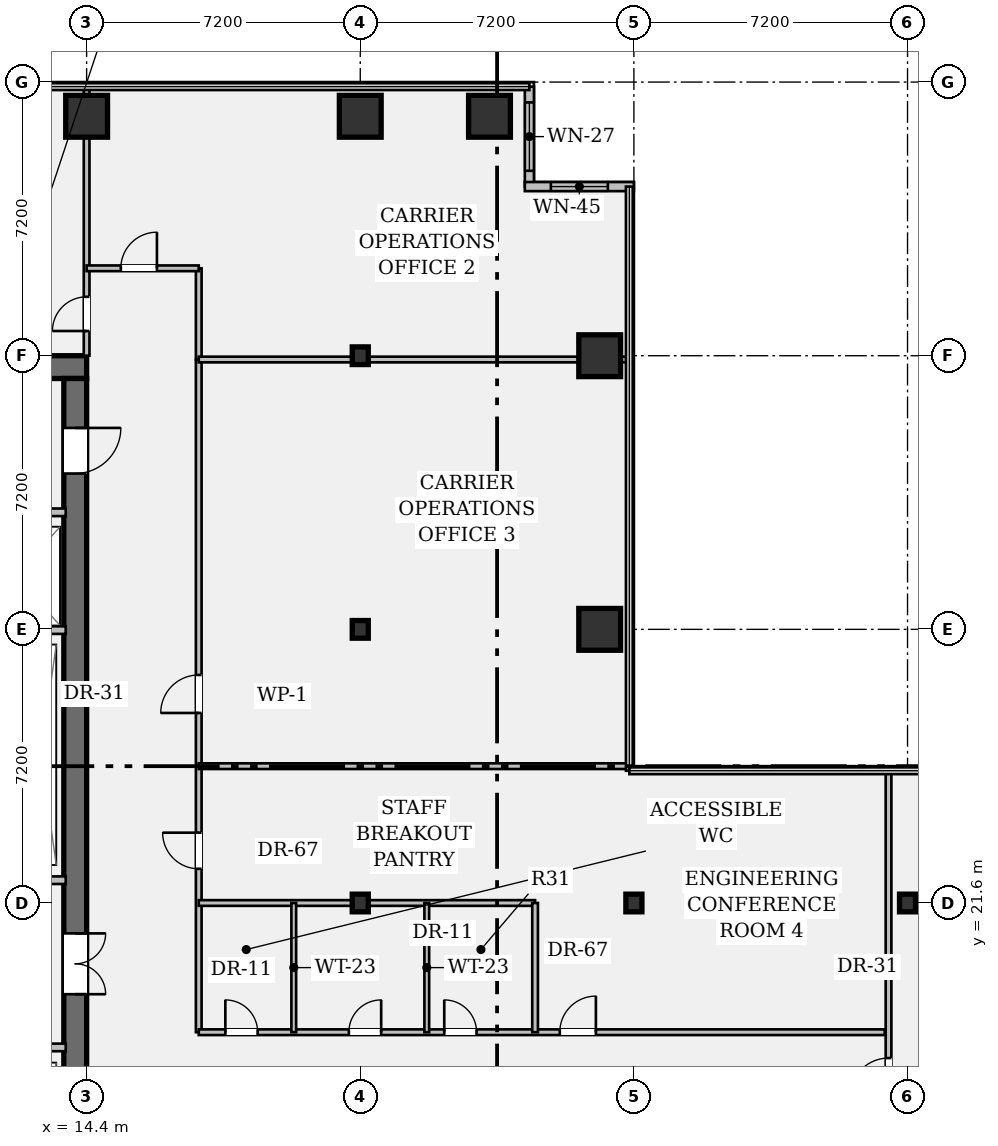
"""IFC4 building model, lengths in metres.
Left out: names, types, materials, properties, quantities, classifications, styles, units other than length and angle.
Written with IfcOpenShell. Run it as: python <this file> out.ifc"""

import sys

from ifc_helpers import new_model, si_unit, direction, frame, frame_2d, origin, origin_2d, place, context, subcontext, project, spatial, rectangle, hollow_rectangle, i_section, extrude, element, fill, save


model = new_model("IFC4")
c1 = context("Model", 3, precision=1e-05, world=origin(), true_north=direction((0.0, 1.0)))
c2 = subcontext(c1, "Body", "Model", "MODEL_VIEW")
j1 = project(units=[si_unit("LENGTHUNIT", "METRE"), si_unit("PLANEANGLEUNIT", "RADIAN")], contexts=[c1])
p1 = place(None, origin())
s1 = spatial("IfcSite", under=j1, at=p1, CompositionType="ELEMENT")
p2 = place(p1, origin())
s2 = spatial("IfcBuilding", under=s1, at=p2, CompositionType="ELEMENT")
p3 = place(p2, frame((0.0, 0.0, 42.7)))
s3 = spatial("IfcBuildingStorey", under=s2, at=p3, CompositionType="ELEMENT", Elevation=42.7)
p4 = place(p3, frame((0.6, 35.7, 0.0), z_axis=(0.0, 0.0, 1.0), x_axis=(1.0, 0.0, 0.0)))
e1 = element("IfcWall", 1, at=p4, inside=s3, PredefinedType="SHEAR", context=c2, shape_type="SweptSolid", body=[
    extrude(rectangle(XDim=13.8, YDim=0.6, at=frame_2d((6.9, 0.0))), origin(), (0.0, 0.0, 1.0), 3.57),
])
p5 = place(p3, frame((14.1, 35.4, 0.0), z_axis=(0.0, 0.0, 1.0), x_axis=(0.0, -1.0, 0.0)))
e2 = element("IfcWall", 2, at=p5, inside=s3, PredefinedType="SHEAR", context=c2, shape_type="SweptSolid", body=[
    extrude(rectangle(XDim=27.6, YDim=0.6, at=frame_2d((13.8, 0.0))), origin(), (0.0, 0.0, 1.0), 3.57),
])
p6 = place(p5, frame((1.3, 0.0, 0.0)))
e3 = element("IfcOpeningElement", 3, at=p6, cuts=e2, PredefinedType="OPENING", context=c2, shape_type="SweptSolid", body=[
    extrude(rectangle(XDim=1.2, YDim=2.15, at=frame_2d((0.6, 1.075))), frame((0.0, 0.312, 0.0), z_axis=(0.0, -1.0, 0.0), x_axis=(1.0, 0.0, 0.0)), (0.0, 0.0, 1.0), 0.624),
])
p7 = place(p5, frame((25.25, 0.0, 0.0)))
e4 = element("IfcOpeningElement", 4, at=p7, cuts=e2, PredefinedType="OPENING", context=c2, shape_type="SweptSolid", body=[
    extrude(rectangle(XDim=1.2, YDim=2.15, at=frame_2d((0.6, 1.075))), frame((0.0, 0.312, 0.0), z_axis=(0.0, -1.0, 0.0), x_axis=(1.0, 0.0, 0.0)), (0.0, 0.0, 1.0), 0.624),
])
p8 = place(p5, frame((14.6, 0.0, 0.0)))
e5 = element("IfcOpeningElement", 5, at=p8, cuts=e2, PredefinedType="OPENING", context=c2, shape_type="SweptSolid", body=[
    extrude(rectangle(XDim=1.6, YDim=2.2, at=frame_2d((0.8, 1.1))), frame((0.0, 0.312, 0.0), z_axis=(0.0, -1.0, 0.0), x_axis=(1.0, 0.0, 0.0)), (0.0, 0.0, 1.0), 0.624),
])
p9 = place(p3, frame((14.4, 42.3, 0.0), z_axis=(0.0, 0.0, 1.0), x_axis=(1.0, 0.0, 0.0)))
e6 = element("IfcColumn", 6, at=p9, inside=s3, PredefinedType="COLUMN", context=c2, shape_type="SweptSolid", body=[
    extrude(hollow_rectangle(XDim=1.1, YDim=1.1, WallThickness=0.07, at=origin_2d()), origin(), (0.0, 0.0, 1.0), 3.57),
])
for number, where, z_axis, x_axis in (
    (7, (21.6, 21.6, 0.0), (0.0, 0.0, 1.0), (1.0, 0.0, 0.0)),
    (8, (21.6, 28.8, 0.0), (0.0, 0.0, 1.0), (1.0, 0.0, 0.0)),
    (9, (21.6, 36.0, 0.0), (0.0, 0.0, 1.0), (1.0, 0.0, 0.0)),
):
    element("IfcColumn", number, at=place(p3, frame(where, z_axis=z_axis, x_axis=x_axis)), inside=s3, PredefinedType="COLUMN", context=c2, shape_type="SweptSolid", body=[
        extrude(i_section(OverallWidth=0.422, OverallDepth=0.465, WebThickness=0.045, FlangeThickness=0.073, FilletRadius=0.018, at=origin_2d()), origin(), (0.0, 0.0, 1.0), 3.57),
    ])
for number, where, z_axis, x_axis in (
    (10, (21.6, 42.3, 0.0), (0.0, 0.0, 1.0), (1.0, 0.0, 0.0)),
    (11, (25.0, 42.3, 0.0), (0.0, 0.0, 1.0), (1.0, 0.0, 0.0)),
    (12, (27.9, 28.8, 0.0), (0.0, 0.0, 1.0), (1.0, 0.0, 0.0)),
    (13, (27.9, 36.0, 0.0), (0.0, 0.0, 1.0), (1.0, 0.0, 0.0)),
):
    element("IfcColumn", number, at=place(p3, frame(where, z_axis=z_axis, x_axis=x_axis)), inside=s3, PredefinedType="COLUMN", context=c2, shape_type="SweptSolid", body=[
        extrude(hollow_rectangle(XDim=1.1, YDim=1.1, WallThickness=0.07, at=origin_2d()), origin(), (0.0, 0.0, 1.0), 3.57),
    ])
for number, where, z_axis, x_axis in (
    (14, (28.8, 21.6, 0.0), (0.0, 0.0, 1.0), (1.0, 0.0, 0.0)),
    (15, (36.0, 21.6, 0.0), (0.0, 0.0, 1.0), (1.0, 0.0, 0.0)),
):
    element("IfcColumn", number, at=place(p3, frame(where, z_axis=z_axis, x_axis=x_axis)), inside=s3, PredefinedType="COLUMN", context=c2, shape_type="SweptSolid", body=[
        extrude(i_section(OverallWidth=0.422, OverallDepth=0.465, WebThickness=0.045, FlangeThickness=0.073, FilletRadius=0.018, at=origin_2d()), origin(), (0.0, 0.0, 1.0), 3.57),
    ])
p10 = place(p3, frame((26.05, 43.08, 0.0), z_axis=(0.0, 0.0, 1.0), x_axis=(0.0, -1.0, 0.0)))
e16 = element("IfcWall", 16, at=p10, inside=s3, PredefinedType="STANDARD", context=c2, shape_type="SweptSolid", body=[
    extrude(rectangle(XDim=2.63, YDim=0.24, at=frame_2d((1.315, 0.0))), origin(), (0.0, 0.0, 1.0), 3.57),
])
p11 = place(p10, frame((0.415, 0.0, 0.95)))
e17 = element("IfcOpeningElement", 17, at=p11, cuts=e16, PredefinedType="OPENING", context=c2, shape_type="SweptSolid", body=[
    extrude(rectangle(XDim=1.8, YDim=1.35, at=frame_2d((0.9, 0.675))), frame((0.0, 0.132, 0.0), z_axis=(0.0, -1.0, 0.0), x_axis=(1.0, 0.0, 0.0)), (0.0, 0.0, 1.0), 0.264),
])
p12 = place(p3, frame((25.93, 40.45, 0.0), z_axis=(0.0, 0.0, 1.0), x_axis=(1.0, 0.0, 0.0)))
e18 = element("IfcWall", 18, at=p12, inside=s3, PredefinedType="STANDARD", context=c2, shape_type="SweptSolid", body=[
    extrude(rectangle(XDim=2.87, YDim=0.24, at=frame_2d((1.435, 0.0))), origin(), (0.0, 0.0, 1.0), 3.57),
])
p13 = place(p12, frame((0.685, 0.0, 0.95)))
e19 = element("IfcOpeningElement", 19, at=p13, cuts=e18, PredefinedType="OPENING", context=c2, shape_type="SweptSolid", body=[
    extrude(rectangle(XDim=1.5, YDim=1.8, at=frame_2d((0.75, 0.9))), frame((0.0, 0.132, 0.0), z_axis=(0.0, -1.0, 0.0), x_axis=(1.0, 0.0, 0.0)), (0.0, 0.0, 1.0), 0.264),
])
p14 = place(p3, frame((8.7, 31.88, 0.0), z_axis=(0.0, 0.0, 1.0), x_axis=(1.0, 0.0, 0.0)))
e20 = element("IfcWall", 20, at=p14, inside=s3, PredefinedType="PARTITIONING", context=c2, shape_type="SweptSolid", body=[
    extrude(rectangle(XDim=5.15, YDim=0.2, at=frame_2d((2.575, 0.0))), origin(), (0.0, 0.0, 1.0), 3.57),
])
p15 = place(p14, frame((0.75, 0.0, 0.0)))
e21 = element("IfcOpeningElement", 21, at=p15, cuts=e20, PredefinedType="OPENING", context=c2, shape_type="SweptSolid", body=[
    extrude(rectangle(XDim=1.2, YDim=2.2, at=frame_2d((0.6, 1.1))), frame((0.0, 0.112, 0.0), z_axis=(0.0, -1.0, 0.0), x_axis=(1.0, 0.0, 0.0)), (0.0, 0.0, 1.0), 0.224),
])
p16 = place(p14, frame((3.25, 0.0, 0.0)))
e22 = element("IfcOpeningElement", 22, at=p16, cuts=e20, PredefinedType="OPENING", context=c2, shape_type="SweptSolid", body=[
    extrude(rectangle(XDim=1.2, YDim=2.2, at=frame_2d((0.6, 1.1))), frame((0.0, 0.112, 0.0), z_axis=(0.0, -1.0, 0.0), x_axis=(1.0, 0.0, 0.0)), (0.0, 0.0, 1.0), 0.224),
])
p17 = place(p3, frame((8.7, 28.78, 0.0), z_axis=(0.0, 0.0, 1.0), x_axis=(1.0, 0.0, 0.0)))
e23 = element("IfcWall", 23, at=p17, inside=s3, PredefinedType="PARTITIONING", context=c2, shape_type="SweptSolid", body=[
    extrude(rectangle(XDim=5.15, YDim=0.2, at=frame_2d((2.575, 0.0))), origin(), (0.0, 0.0, 1.0), 3.57),
])
for number, where, z_axis, x_axis in (
    (24, (7.1, 22.2, 0.0), (0.0, 0.0, 1.0), (1.0, 0.0, 0.0)),
    (25, (7.1, 17.8, 0.0), (0.0, 0.0, 1.0), (1.0, 0.0, 0.0)),
):
    element("IfcWall", number, at=place(p3, frame(where, z_axis=z_axis, x_axis=x_axis)), inside=s3, PredefinedType="PARTITIONING", context=c2, shape_type="SweptSolid", body=[
        extrude(rectangle(XDim=6.75, YDim=0.2, at=frame_2d((3.375, 0.0))), origin(), (0.0, 0.0, 1.0), 3.57),
    ])
p18 = place(p3, frame((17.35, 18.2, 0.0), z_axis=(0.0, 0.0, 1.0), x_axis=(0.0, 1.0, 0.0)))
e26 = element("IfcWall", 26, at=p18, inside=s3, PredefinedType="PARTITIONING", context=c2, shape_type="SweptSolid", body=[
    extrude(rectangle(XDim=17.7, YDim=0.15, at=frame_2d((8.85, 0.0))), origin(), (0.0, 0.0, 1.0), 2.699),
])
p19 = place(p18, frame((4.3, 0.0, 0.0)))
e27 = element("IfcOpeningElement", 27, at=p19, cuts=e26, PredefinedType="OPENING", context=c2, shape_type="SweptSolid", body=[
    extrude(rectangle(XDim=0.95, YDim=2.15, at=frame_2d((0.475, 1.075))), frame((0.0, 0.087, 0.0), z_axis=(0.0, -1.0, 0.0), x_axis=(1.0, 0.0, 0.0)), (0.0, 0.0, 1.0), 0.174),
])
p20 = place(p18, frame((8.4, 0.0, 0.0)))
e28 = element("IfcOpeningElement", 28, at=p20, cuts=e26, PredefinedType="OPENING", context=c2, shape_type="SweptSolid", body=[
    extrude(rectangle(XDim=1.0, YDim=2.15, at=frame_2d((0.5, 1.075))), frame((0.0, 0.087, 0.0), z_axis=(0.0, -1.0, 0.0), x_axis=(1.0, 0.0, 0.0)), (0.0, 0.0, 1.0), 0.174),
])
p21 = place(p3, frame((17.35, 18.2, 0.0), z_axis=(0.0, 0.0, 1.0), x_axis=(1.0, 0.0, 0.0)))
e29 = element("IfcWall", 29, at=p21, inside=s3, PredefinedType="PARTITIONING", context=c2, shape_type="SweptSolid", body=[
    extrude(rectangle(XDim=18.05, YDim=0.15, at=frame_2d((9.025, 0.0))), origin(), (0.0, 0.0, 1.0), 2.699),
])
p22 = place(p21, frame((0.7, 0.0, 0.0)))
e30 = element("IfcOpeningElement", 30, at=p22, cuts=e29, PredefinedType="OPENING", context=c2, shape_type="SweptSolid", body=[
    extrude(rectangle(XDim=0.85, YDim=2.15, at=frame_2d((0.425, 1.075))), frame((0.0, 0.087, 0.0), z_axis=(0.0, -1.0, 0.0), x_axis=(1.0, 0.0, 0.0)), (0.0, 0.0, 1.0), 0.174),
])
p23 = place(p21, frame((3.95, 0.0, 0.0)))
e31 = element("IfcOpeningElement", 31, at=p23, cuts=e29, PredefinedType="OPENING", context=c2, shape_type="SweptSolid", body=[
    extrude(rectangle(XDim=0.85, YDim=2.15, at=frame_2d((0.425, 1.075))), frame((0.0, 0.087, 0.0), z_axis=(0.0, -1.0, 0.0), x_axis=(1.0, 0.0, 0.0)), (0.0, 0.0, 1.0), 0.174),
])
p24 = place(p21, frame((6.46, 0.0, 0.0)))
e32 = element("IfcOpeningElement", 32, at=p24, cuts=e29, PredefinedType="OPENING", context=c2, shape_type="SweptSolid", body=[
    extrude(rectangle(XDim=0.85, YDim=2.15, at=frame_2d((0.425, 1.075))), frame((0.0, 0.087, 0.0), z_axis=(0.0, -1.0, 0.0), x_axis=(1.0, 0.0, 0.0)), (0.0, 0.0, 1.0), 0.174),
])
p25 = place(p21, frame((9.5, 0.0, 0.0)))
e33 = element("IfcOpeningElement", 33, at=p25, cuts=e29, PredefinedType="OPENING", context=c2, shape_type="SweptSolid", body=[
    extrude(rectangle(XDim=0.95, YDim=2.15, at=frame_2d((0.475, 1.075))), frame((0.0, 0.087, 0.0), z_axis=(0.0, -1.0, 0.0), x_axis=(1.0, 0.0, 0.0)), (0.0, 0.0, 1.0), 0.174),
])
p26 = place(p3, frame((35.5, 0.12, 0.0), z_axis=(0.0, 0.0, 1.0), x_axis=(0.0, 1.0, 0.0)))
e34 = element("IfcWall", 34, at=p26, inside=s3, PredefinedType="PARTITIONING", context=c2, shape_type="SweptSolid", body=[
    extrude(rectangle(XDim=24.96, YDim=0.15, at=frame_2d((12.48, 0.0))), origin(), (0.0, 0.0, 1.0), 2.699),
])
p27 = place(p26, frame((16.4, 0.0, 0.0)))
e35 = element("IfcOpeningElement", 35, at=p27, cuts=e34, PredefinedType="OPENING", context=c2, shape_type="SweptSolid", body=[
    extrude(rectangle(XDim=1.0, YDim=2.15, at=frame_2d((0.5, 1.075))), frame((0.0, 0.087, 0.0), z_axis=(0.0, -1.0, 0.0), x_axis=(1.0, 0.0, 0.0)), (0.0, 0.0, 1.0), 0.174),
])
p28 = place(p3, frame((14.4, 36.0, 0.0), z_axis=(0.0, 0.0, 1.0), x_axis=(0.0, 1.0, 0.0)))
e36 = element("IfcWall", 36, at=p28, inside=s3, PredefinedType="PARTITIONING", context=c2, shape_type="SweptSolid", body=[
    extrude(rectangle(XDim=7.08, YDim=0.15, at=frame_2d((3.54, 0.0))), origin(), (0.0, 0.0, 1.0), 2.699),
])
p29 = place(p28, frame((0.65, 0.0, 0.0)))
e37 = element("IfcOpeningElement", 37, at=p29, cuts=e36, PredefinedType="OPENING", context=c2, shape_type="SweptSolid", body=[
    extrude(rectangle(XDim=0.9, YDim=2.15, at=frame_2d((0.45, 1.075))), frame((0.0, 0.087, 0.0), z_axis=(0.0, -1.0, 0.0), x_axis=(1.0, 0.0, 0.0)), (0.0, 0.0, 1.0), 0.174),
])
p30 = place(p3, frame((17.35, 35.9, 0.0), z_axis=(0.0, 0.0, 1.0), x_axis=(0.0, 1.0, 0.0)))
e38 = element("IfcWall", 38, at=p30, inside=s3, PredefinedType="PARTITIONING", context=c2, shape_type="SweptSolid", body=[
    extrude(rectangle(XDim=2.4, YDim=0.15, at=frame_2d((1.2, 0.0))), origin(), (0.0, 0.0, 1.0), 2.699),
])
p31 = place(p3, frame((14.4, 38.3, 0.0), z_axis=(0.0, 0.0, 1.0), x_axis=(1.0, 0.0, 0.0)))
e39 = element("IfcWall", 39, at=p31, inside=s3, PredefinedType="PARTITIONING", context=c2, shape_type="SweptSolid", body=[
    extrude(rectangle(XDim=2.95, YDim=0.15, at=frame_2d((1.475, 0.0))), origin(), (0.0, 0.0, 1.0), 2.699),
])
p32 = place(p31, frame((0.9, 0.0, 0.0)))
e40 = element("IfcOpeningElement", 40, at=p32, cuts=e39, PredefinedType="OPENING", context=c2, shape_type="SweptSolid", body=[
    extrude(rectangle(XDim=0.95, YDim=2.15, at=frame_2d((0.475, 1.075))), frame((0.0, 0.087, 0.0), z_axis=(0.0, -1.0, 0.0), x_axis=(1.0, 0.0, 0.0)), (0.0, 0.0, 1.0), 0.174),
])
p33 = place(p3, frame((17.35, 35.9, 0.0), z_axis=(0.0, 0.0, 1.0), x_axis=(1.0, 0.0, 0.0)))
e41 = element("IfcWall", 41, at=p33, inside=s3, PredefinedType="PARTITIONING", context=c2, shape_type="SweptSolid", body=[
    extrude(rectangle(XDim=11.33, YDim=0.15, at=frame_2d((5.665, 0.0))), origin(), (0.0, 0.0, 1.0), 2.699),
])
p34 = place(p3, frame((17.35, 21.6, 0.0), z_axis=(0.0, 0.0, 1.0), x_axis=(1.0, 0.0, 0.0)))
e42 = element("IfcWall", 42, at=p34, inside=s3, PredefinedType="PARTITIONING", context=c2, shape_type="SweptSolid", body=[
    extrude(rectangle(XDim=8.85, YDim=0.15, at=frame_2d((4.425, 0.0))), origin(), (0.0, 0.0, 1.0), 2.699),
])
p35 = place(p3, frame((26.2, 18.2, 0.0), z_axis=(0.0, 0.0, 1.0), x_axis=(0.0, 1.0, 0.0)))
e43 = element("IfcWall", 43, at=p35, inside=s3, PredefinedType="PARTITIONING", context=c2, shape_type="SweptSolid", body=[
    extrude(rectangle(XDim=3.4, YDim=0.15, at=frame_2d((1.7, 0.0))), origin(), (0.0, 0.0, 1.0), 2.699),
])
for number, where, z_axis, x_axis in (
    (44, (19.85, 18.2, 0.0), (0.0, 0.0, 1.0), (0.0, 1.0, 0.0)),
    (45, (23.35, 18.2, 0.0), (0.0, 0.0, 1.0), (0.0, 1.0, 0.0)),
):
    element("IfcWall", number, at=place(p3, frame(where, z_axis=z_axis, x_axis=x_axis)), inside=s3, PredefinedType="PARTITIONING", context=c2, shape_type="SweptSolid", body=[
        extrude(rectangle(XDim=3.4, YDim=0.125, at=frame_2d((1.7, 0.0))), origin(), (0.0, 0.0, 1.0), 2.699),
    ])
p36 = place(p3, frame((17.35, 25.2, 0.0), z_axis=(0.0, 0.0, 1.0), x_axis=(1.0, 0.0, 0.0)))
e46 = element("IfcWall", 46, at=p36, inside=s3, PredefinedType="PARTITIONING", context=c2, shape_type="SweptSolid", body=[
    extrude(rectangle(XDim=11.33, YDim=0.15, at=frame_2d((5.665, 0.0))), origin(), (0.0, 0.0, 1.0), 2.699),
])
p37 = place(p11, origin())
e47 = element("IfcWindow", 47, at=p37, inside=s3, PartitioningType="SINGLE_PANEL", PredefinedType="WINDOW", context=c2, shape_type="SweptSolid", body=[
    extrude(rectangle(XDim=1.8, YDim=1.35, at=frame_2d((0.9, 0.675))), frame((0.0, 0.03, 0.0), z_axis=(0.0, -1.0, 0.0), x_axis=(1.0, 0.0, 0.0)), (0.0, 0.0, 1.0), 0.06),
])
fill(e17, e47)
p38 = place(p13, origin())
e48 = element("IfcWindow", 48, at=p38, inside=s3, PartitioningType="SINGLE_PANEL", PredefinedType="WINDOW", context=c2, shape_type="SweptSolid", body=[
    extrude(rectangle(XDim=1.5, YDim=1.8, at=frame_2d((0.75, 0.9))), frame((0.0, 0.03, 0.0), z_axis=(0.0, -1.0, 0.0), x_axis=(1.0, 0.0, 0.0)), (0.0, 0.0, 1.0), 0.06),
])
fill(e19, e48)
p39 = place(p6, origin())
e49 = element("IfcDoor", 49, at=p39, inside=s3, OperationType="SINGLE_SWING_LEFT", PredefinedType="DOOR", context=c2, shape_type="SweptSolid", body=[
    extrude(rectangle(XDim=1.2, YDim=2.15, at=frame_2d((0.6, 1.075))), frame((0.0, 0.025, 0.0), z_axis=(0.0, -1.0, 0.0), x_axis=(1.0, 0.0, 0.0)), (0.0, 0.0, 1.0), 0.05),
])
fill(e3, e49)
p40 = place(p8, origin())
e50 = element("IfcDoor", 50, at=p40, inside=s3, OperationType="DOUBLE_DOOR_SINGLE_SWING", PredefinedType="DOOR", context=c2, shape_type="SweptSolid", body=[
    extrude(rectangle(XDim=1.6, YDim=2.2, at=frame_2d((0.8, 1.1))), frame((0.0, 0.025, 0.0), z_axis=(0.0, -1.0, 0.0), x_axis=(1.0, 0.0, 0.0)), (0.0, 0.0, 1.0), 0.05),
])
fill(e5, e50)
p41 = place(p29, origin())
e51 = element("IfcDoor", 51, at=p41, inside=s3, OperationType="SINGLE_SWING_LEFT", PredefinedType="DOOR", context=c2, shape_type="SweptSolid", body=[
    extrude(rectangle(XDim=0.9, YDim=2.15, at=frame_2d((0.45, 1.075))), frame((0.0, 0.025, 0.0), z_axis=(0.0, -1.0, 0.0), x_axis=(1.0, 0.0, 0.0)), (0.0, 0.0, 1.0), 0.05),
])
fill(e37, e51)
p42 = place(p32, origin())
e52 = element("IfcDoor", 52, at=p42, inside=s3, OperationType="SINGLE_SWING_RIGHT", PredefinedType="DOOR", context=c2, shape_type="SweptSolid", body=[
    extrude(rectangle(XDim=0.95, YDim=2.15, at=frame_2d((0.475, 1.075))), frame((0.0, 0.025, 0.0), z_axis=(0.0, -1.0, 0.0), x_axis=(1.0, 0.0, 0.0)), (0.0, 0.0, 1.0), 0.05),
])
fill(e40, e52)
p43 = place(p22, origin())
e53 = element("IfcDoor", 53, at=p43, inside=s3, OperationType="SINGLE_SWING_LEFT", PredefinedType="DOOR", context=c2, shape_type="SweptSolid", body=[
    extrude(rectangle(XDim=0.85, YDim=2.15, at=frame_2d((0.425, 1.075))), frame((0.0, 0.025, 0.0), z_axis=(0.0, -1.0, 0.0), x_axis=(1.0, 0.0, 0.0)), (0.0, 0.0, 1.0), 0.05),
])
fill(e30, e53)
p44 = place(p23, origin())
e54 = element("IfcDoor", 54, at=p44, inside=s3, OperationType="SINGLE_SWING_RIGHT", PredefinedType="DOOR", context=c2, shape_type="SweptSolid", body=[
    extrude(rectangle(XDim=0.85, YDim=2.15, at=frame_2d((0.425, 1.075))), frame((0.0, 0.025, 0.0), z_axis=(0.0, -1.0, 0.0), x_axis=(1.0, 0.0, 0.0)), (0.0, 0.0, 1.0), 0.05),
])
fill(e31, e54)
p45 = place(p24, origin())
e55 = element("IfcDoor", 55, at=p45, inside=s3, OperationType="SINGLE_SWING_LEFT", PredefinedType="DOOR", context=c2, shape_type="SweptSolid", body=[
    extrude(rectangle(XDim=0.85, YDim=2.15, at=frame_2d((0.425, 1.075))), frame((0.0, 0.025, 0.0), z_axis=(0.0, -1.0, 0.0), x_axis=(1.0, 0.0, 0.0)), (0.0, 0.0, 1.0), 0.05),
])
fill(e32, e55)
p46 = place(p19, origin())
e56 = element("IfcDoor", 56, at=p46, inside=s3, OperationType="SINGLE_SWING_RIGHT", PredefinedType="DOOR", context=c2, shape_type="SweptSolid", body=[
    extrude(rectangle(XDim=0.95, YDim=2.15, at=frame_2d((0.475, 1.075))), frame((0.0, 0.025, 0.0), z_axis=(0.0, -1.0, 0.0), x_axis=(1.0, 0.0, 0.0)), (0.0, 0.0, 1.0), 0.05),
])
fill(e27, e56)
p47 = place(p20, origin())
e57 = element("IfcDoor", 57, at=p47, inside=s3, OperationType="SINGLE_SWING_LEFT", PredefinedType="DOOR", context=c2, shape_type="SweptSolid", body=[
    extrude(rectangle(XDim=1.0, YDim=2.15, at=frame_2d((0.5, 1.075))), frame((0.0, 0.025, 0.0), z_axis=(0.0, -1.0, 0.0), x_axis=(1.0, 0.0, 0.0)), (0.0, 0.0, 1.0), 0.05),
])
fill(e28, e57)
p48 = place(p25, origin())
e58 = element("IfcDoor", 58, at=p48, inside=s3, OperationType="SINGLE_SWING_RIGHT", PredefinedType="DOOR", context=c2, shape_type="SweptSolid", body=[
    extrude(rectangle(XDim=0.95, YDim=2.15, at=frame_2d((0.475, 1.075))), frame((0.0, 0.025, 0.0), z_axis=(0.0, -1.0, 0.0), x_axis=(1.0, 0.0, 0.0)), (0.0, 0.0, 1.0), 0.05),
])
fill(e33, e58)
p49 = place(p27, origin())
e59 = element("IfcDoor", 59, at=p49, inside=s3, OperationType="SINGLE_SWING_LEFT", PredefinedType="DOOR", context=c2, shape_type="SweptSolid", body=[
    extrude(rectangle(XDim=1.0, YDim=2.15, at=frame_2d((0.5, 1.075))), frame((0.0, 0.025, 0.0), z_axis=(0.0, -1.0, 0.0), x_axis=(1.0, 0.0, 0.0)), (0.0, 0.0, 1.0), 0.05),
])
fill(e35, e59)
save(model, sys.argv[1])
